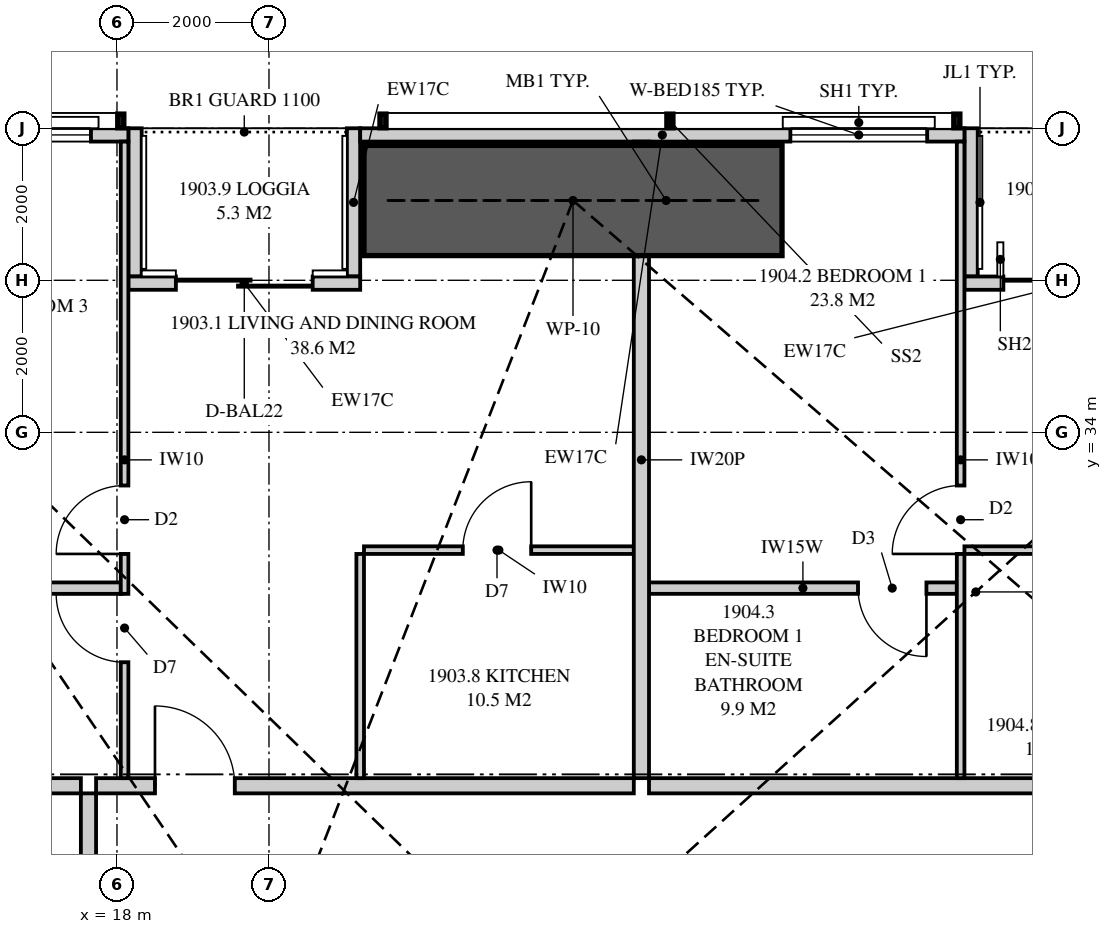
"""IFC4 building model, lengths in metres.
Left out: names, types, materials, properties, quantities, classifications, styles, units other than length and angle.
Written with IfcOpenShell. Run it as: python <this file> out.ifc"""

import sys

from ifc_helpers import new_model, si_unit, direction, frame, frame_2d, origin, place, context, subcontext, project, spatial, polyline, rectangle, outline, extrude, element, fill, save


model = new_model("IFC4")
c1 = context("Model", 3, precision=1e-05, world=origin(), true_north=direction((0.0, 1.0)))
c2 = subcontext(c1, "Body", "Model", "MODEL_VIEW")
j1 = project(units=[si_unit("LENGTHUNIT", "METRE"), si_unit("PLANEANGLEUNIT", "RADIAN")], contexts=[c1])
p1 = place(None, origin())
s1 = spatial("IfcSite", under=j1, at=p1, CompositionType="ELEMENT")
p2 = place(p1, origin())
s2 = spatial("IfcBuilding", under=s1, at=p2, CompositionType="ELEMENT")
p3 = place(p2, frame((0.0, 0.0, 71.25)))
s3 = spatial("IfcBuildingStorey", under=s2, at=p3, CompositionType="ELEMENT", Elevation=71.25)
p4 = place(p3, frame((29.15, 37.913, 0.0), z_axis=(0.0, 0.0, 1.0), x_axis=(-1.0, 0.0, 0.0)))
e1 = element("IfcWall", 1, at=p4, inside=s3, PredefinedType="SOLIDWALL", context=c2, shape_type="SweptSolid", body=[
    extrude(rectangle(XDim=7.95, YDim=0.175, at=frame_2d((3.975, 0.0))), origin(), (0.0, 0.0, 1.0), 3.22),
])
p5 = place(p4, frame((0.49, 0.0, 0.4)))
e2 = element("IfcOpeningElement", 2, at=p5, cuts=e1, PredefinedType="OPENING", context=c2, shape_type="SweptSolid", body=[
    extrude(rectangle(XDim=1.8, YDim=1.85, at=frame_2d((0.9, 0.925))), frame((0.0, 0.097, 0.0), z_axis=(0.0, -1.0, 0.0), x_axis=(1.0, 0.0, 0.0)), (0.0, 0.0, 1.0), 0.195),
])
p6 = place(p3, frame((18.15, 37.913, 0.0), z_axis=(0.0, 0.0, 1.0), x_axis=(-1.0, 0.0, 0.0)))
e3 = element("IfcWall", 3, at=p6, inside=s3, PredefinedType="SOLIDWALL", context=c2, shape_type="SweptSolid", body=[
    extrude(rectangle(XDim=13.099, YDim=0.175, at=frame_2d((6.549, 0.0))), origin(), (0.0, 0.0, 1.0), 3.22),
])
p7 = place(p6, frame((0.492, 0.0, 0.4)))
e4 = element("IfcOpeningElement", 4, at=p7, cuts=e3, PredefinedType="OPENING", context=c2, shape_type="SweptSolid", body=[
    extrude(rectangle(XDim=1.8, YDim=1.85, at=frame_2d((0.9, 0.925))), frame((0.0, 0.097, 0.0), z_axis=(0.0, -1.0, 0.0), x_axis=(1.0, 0.0, 0.0)), (0.0, 0.0, 1.0), 0.195),
])
p8 = place(p6, frame((8.065, 0.0, 0.4)))
e5 = element("IfcOpeningElement", 5, at=p8, cuts=e3, PredefinedType="OPENING", context=c2, shape_type="SweptSolid", body=[
    extrude(rectangle(XDim=1.8, YDim=1.85, at=frame_2d((0.9, 0.925))), frame((0.0, 0.097, 0.0), z_axis=(0.0, -1.0, 0.0), x_axis=(1.0, 0.0, 0.0)), (0.0, 0.0, 1.0), 0.195),
])
p9 = place(p3, frame((31.975, 35.962, 0.0), z_axis=(0.0, 0.0, 1.0), x_axis=(-1.0, 0.0, 0.0)))
e6 = element("IfcWall", 6, at=p9, inside=s3, PredefinedType="SOLIDWALL", context=c2, shape_type="SweptSolid", body=[
    extrude(rectangle(XDim=2.825, YDim=0.175, at=frame_2d((1.413, 0.0))), origin(), (0.0, 0.0, 1.0), 3.22),
])
p10 = place(p9, frame((0.512, 0.0, 0.0)))
e7 = element("IfcOpeningElement", 7, at=p10, cuts=e6, PredefinedType="OPENING", context=c2, shape_type="SweptSolid", body=[
    extrude(rectangle(XDim=1.8, YDim=2.25, at=frame_2d((0.9, 1.125))), frame((0.0, 0.097, 0.0), z_axis=(0.0, -1.0, 0.0), x_axis=(1.0, 0.0, 0.0)), (0.0, 0.0, 1.0), 0.195),
])
p11 = place(p3, frame((29.238, 38.0, 0.0), z_axis=(0.0, 0.0, 1.0), x_axis=(0.0, -1.0, 0.0)))
e8 = element("IfcWall", 8, at=p11, inside=s3, PredefinedType="SOLIDWALL", context=c2, shape_type="SweptSolid", body=[
    extrude(outline(polyline([(0.0, 0.0), (1.95, 0.0), (1.95, 3.22), (1.65, 3.22), (1.65, 2.1), (0.25, 2.1), (0.25, 3.22), (0.0, 3.22), (0.0, 0.0)])), frame((0.0, 0.087, 0.0), z_axis=(0.0, -1.0, 0.0), x_axis=(1.0, 0.0, 0.0)), (0.0, 0.0, 1.0), 0.175),
])
p12 = place(p3, frame((21.2, 35.962, 0.0), z_axis=(0.0, 0.0, 1.0), x_axis=(-1.0, 0.0, 0.0)))
e9 = element("IfcWall", 9, at=p12, inside=s3, PredefinedType="SOLIDWALL", context=c2, shape_type="SweptSolid", body=[
    extrude(rectangle(XDim=3.05, YDim=0.175, at=frame_2d((1.525, 0.0))), origin(), (0.0, 0.0, 1.0), 3.22),
])
p13 = place(p12, frame((0.625, 0.0, 0.0)))
e10 = element("IfcOpeningElement", 10, at=p13, cuts=e9, PredefinedType="OPENING", context=c2, shape_type="SweptSolid", body=[
    extrude(rectangle(XDim=1.8, YDim=2.25, at=frame_2d((0.9, 1.125))), frame((0.0, 0.097, 0.0), z_axis=(0.0, -1.0, 0.0), x_axis=(1.0, 0.0, 0.0)), (0.0, 0.0, 1.0), 0.195),
])
for number, where, z_axis, x_axis in (
    (11, (21.113, 38.0, 0.0), (0.0, 0.0, 1.0), (0.0, -1.0, 0.0)),
    (12, (18.238, 38.0, 0.0), (0.0, 0.0, 1.0), (0.0, -1.0, 0.0)),
):
    element("IfcWall", number, at=place(p3, frame(where, z_axis=z_axis, x_axis=x_axis)), inside=s3, PredefinedType="SOLIDWALL", context=c2, shape_type="SweptSolid", body=[
        extrude(outline(polyline([(0.0, 0.0), (1.95, 0.0), (1.95, 3.22), (1.65, 3.22), (1.65, 2.1), (0.25, 2.1), (0.25, 3.22), (0.0, 3.22), (0.0, 0.0)])), frame((0.0, 0.087, 0.0), z_axis=(0.0, -1.0, 0.0), x_axis=(1.0, 0.0, 0.0)), (0.0, 0.0, 1.0), 0.175),
    ])
p14 = place(p3, frame((24.9, 37.825, 0.0), z_axis=(0.0, 0.0, 1.0), x_axis=(0.0, -1.0, 0.0)))
e13 = element("IfcWall", 13, at=p14, inside=s3, PredefinedType="PARTITIONING", context=c2, shape_type="SweptSolid", body=[
    extrude(outline(polyline([(8.375, 0.0), (8.375, 3.22), (1.953, 3.22), (1.953, 2.641), (1.475, 2.641), (1.475, 2.1), (1.021, 2.1), (1.021, 1.356), (0.529, 1.356), (0.529, 2.1), (0.075, 2.1), (0.075, 3.22), (0.0, 3.22), (0.0, 0.0), (0.529, 0.0), (0.529, 0.944), (1.021, 0.944), (1.021, 0.0), (8.375, 0.0)])), frame((0.0, 0.1, 0.0), z_axis=(0.0, -1.0, 0.0), x_axis=(1.0, 0.0, 0.0)), (0.0, 0.0, 1.0), 0.2),
])
p15 = place(p3, frame((17.725, 29.35, 0.0), z_axis=(0.0, 0.0, 1.0), x_axis=(1.0, 0.0, 0.0)))
e14 = element("IfcWall", 14, at=p15, inside=s3, PredefinedType="PARTITIONING", context=c2, shape_type="SweptSolid", body=[
    extrude(outline(polyline([(0.0, 0.0), (7.075, 0.0), (7.075, 3.22), (6.564, 3.22), (6.564, 2.694), (5.986, 2.694), (5.986, 3.22), (3.641, 3.22), (3.641, 2.641), (2.757, 2.641), (2.757, 3.22), (0.862, 3.22), (0.862, 2.641), (0.155, 2.641), (0.155, 3.22), (0.0, 3.22), (0.0, 0.0)])), frame((0.0, 0.1, 0.0), z_axis=(0.0, -1.0, 0.0), x_axis=(1.0, 0.0, 0.0)), (0.0, 0.0, 1.0), 0.2),
])
p16 = place(p15, frame((0.775, 0.0, 0.0)))
e15 = element("IfcOpeningElement", 15, at=p16, cuts=e14, PredefinedType="OPENING", context=c2, shape_type="SweptSolid", body=[
    extrude(rectangle(XDim=1.05, YDim=2.2, at=frame_2d((0.525, 1.1))), frame((0.0, 0.11, 0.0), z_axis=(0.0, -1.0, 0.0), x_axis=(1.0, 0.0, 0.0)), (0.0, 0.0, 1.0), 0.22),
])
p17 = place(p3, frame((18.1, 37.825, 0.0), z_axis=(0.0, 0.0, 1.0), x_axis=(0.0, -1.0, 0.0)))
e16 = element("IfcWall", 16, at=p17, inside=s3, PredefinedType="PARTITIONING", context=c2, shape_type="SweptSolid", body=[
    extrude(outline(polyline([(0.0, 0.0), (8.375, 0.0), (8.375, 2.641), (7.785, 2.641), (7.785, 3.22), (6.109, 3.22), (6.109, 2.641), (5.353, 2.641), (5.353, 3.22), (1.475, 3.22), (1.475, 2.1), (0.075, 2.1), (0.075, 3.22), (0.0, 3.22), (0.0, 0.0)])), frame((0.0, 0.05, 0.0), z_axis=(0.0, -1.0, 0.0), x_axis=(1.0, 0.0, 0.0)), (0.0, 0.0, 1.0), 0.1),
])
p18 = place(p17, frame((4.525, 0.0, 0.0)))
e17 = element("IfcOpeningElement", 17, at=p18, cuts=e16, PredefinedType="OPENING", context=c2, shape_type="SweptSolid", body=[
    extrude(rectangle(XDim=0.9, YDim=2.1, at=frame_2d((0.45, 1.05))), frame((0.0, 0.06, 0.0), z_axis=(0.0, -1.0, 0.0), x_axis=(1.0, 0.0, 0.0)), (0.0, 0.0, 1.0), 0.12),
])
p19 = place(p17, frame((5.95, 0.0, 0.0)))
e18 = element("IfcOpeningElement", 18, at=p19, cuts=e16, PredefinedType="OPENING", context=c2, shape_type="SweptSolid", body=[
    extrude(rectangle(XDim=0.9, YDim=2.1, at=frame_2d((0.45, 1.05))), frame((0.0, 0.06, 0.0), z_axis=(0.0, -1.0, 0.0), x_axis=(1.0, 0.0, 0.0)), (0.0, 0.0, 1.0), 0.12),
])
p20 = place(p3, frame((13.85, 31.95, 0.0), z_axis=(0.0, 0.0, 1.0), x_axis=(1.0, 0.0, 0.0)))
e19 = element("IfcWall", 19, at=p20, inside=s3, PredefinedType="PLUMBINGWALL", context=c2, shape_type="SweptSolid", body=[
    extrude(outline(polyline([(0.0, 0.0), (4.2, 0.0), (4.2, 2.641), (3.982, 2.641), (3.982, 3.22), (2.953, 3.22), (2.953, 2.641), (2.28, 2.641), (2.28, 3.22), (0.0, 3.22), (0.0, 0.0)])), frame((0.0, 0.075, 0.0), z_axis=(0.0, -1.0, 0.0), x_axis=(1.0, 0.0, 0.0)), (0.0, 0.0, 1.0), 0.15),
])
p21 = place(p3, frame((21.25, 32.45, 0.0), z_axis=(0.0, 0.0, 1.0), x_axis=(1.0, 0.0, 0.0)))
e20 = element("IfcWall", 20, at=p21, inside=s3, PredefinedType="PARTITIONING", context=c2, shape_type="SweptSolid", body=[
    extrude(outline(polyline([(0.0, 0.0), (3.55, 0.0), (3.55, 3.22), (3.04, 3.22), (3.04, 2.694), (2.46, 2.694), (2.46, 3.22), (1.236, 3.22), (1.236, 2.641), (0.691, 2.641), (0.691, 3.22), (0.0, 3.22), (0.0, 0.0)])), frame((0.0, 0.05, 0.0), z_axis=(0.0, -1.0, 0.0), x_axis=(1.0, 0.0, 0.0)), (0.0, 0.0, 1.0), 0.1),
])
p22 = place(p21, frame((1.3, 0.0, 0.0)))
e21 = element("IfcOpeningElement", 21, at=p22, cuts=e20, PredefinedType="OPENING", context=c2, shape_type="SweptSolid", body=[
    extrude(rectangle(XDim=0.9, YDim=2.1, at=frame_2d((0.45, 1.05))), frame((0.0, 0.06, 0.0), z_axis=(0.0, -1.0, 0.0), x_axis=(1.0, 0.0, 0.0)), (0.0, 0.0, 1.0), 0.12),
])
p23 = place(p3, frame((21.2, 32.4, 0.0), z_axis=(0.0, 0.0, 1.0), x_axis=(0.0, -1.0, 0.0)))
e22 = element("IfcWall", 22, at=p23, inside=s3, PredefinedType="PARTITIONING", context=c2, shape_type="SweptSolid", body=[
    extrude(outline(polyline([(0.0, 0.0), (2.95, 0.0), (2.95, 2.641), (1.779, 2.641), (1.779, 3.22), (0.0, 3.22), (0.0, 0.0)])), frame((0.0, 0.05, 0.0), z_axis=(0.0, -1.0, 0.0), x_axis=(1.0, 0.0, 0.0)), (0.0, 0.0, 1.0), 0.1),
])
p24 = place(p3, frame((25.0, 29.35, 0.0), z_axis=(0.0, 0.0, 1.0), x_axis=(1.0, 0.0, 0.0)))
e23 = element("IfcWall", 23, at=p24, inside=s3, PredefinedType="PARTITIONING", context=c2, shape_type="SweptSolid", body=[
    extrude(outline(polyline([(0.0, 0.0), (9.05, 0.0), (9.05, 3.22), (8.373, 3.22), (8.373, 2.641), (7.42, 2.641), (7.42, 3.22), (1.941, 3.22), (1.941, 2.641), (1.015, 2.641), (1.015, 3.22), (0.0, 3.22), (0.0, 0.0)])), frame((0.0, 0.1, 0.0), z_axis=(0.0, -1.0, 0.0), x_axis=(1.0, 0.0, 0.0)), (0.0, 0.0, 1.0), 0.2),
])
p25 = place(p3, frame((29.1, 37.825, 0.0), z_axis=(0.0, 0.0, 1.0), x_axis=(0.0, -1.0, 0.0)))
e24 = element("IfcWall", 24, at=p25, inside=s3, PredefinedType="PARTITIONING", context=c2, shape_type="SweptSolid", body=[
    extrude(outline(polyline([(0.0, 0.0), (8.375, 0.0), (8.375, 3.22), (6.469, 3.22), (6.469, 2.641), (5.742, 2.641), (5.742, 3.22), (5.545, 3.22), (5.545, 2.641), (4.833, 2.641), (4.833, 3.22), (1.475, 3.22), (1.475, 2.1), (0.075, 2.1), (0.075, 3.22), (0.0, 3.22), (0.0, 0.0)])), frame((0.0, 0.05, 0.0), z_axis=(0.0, -1.0, 0.0), x_axis=(1.0, 0.0, 0.0)), (0.0, 0.0, 1.0), 0.1),
])
p26 = place(p25, frame((4.525, 0.0, 0.0)))
e25 = element("IfcOpeningElement", 25, at=p26, cuts=e24, PredefinedType="OPENING", context=c2, shape_type="SweptSolid", body=[
    extrude(rectangle(XDim=0.9, YDim=2.1, at=frame_2d((0.45, 1.05))), frame((0.0, 0.06, 0.0), z_axis=(0.0, -1.0, 0.0), x_axis=(1.0, 0.0, 0.0)), (0.0, 0.0, 1.0), 0.12),
])
p27 = place(p3, frame((25.0, 31.95, 0.0), z_axis=(0.0, 0.0, 1.0), x_axis=(1.0, 0.0, 0.0)))
e26 = element("IfcWall", 26, at=p27, inside=s3, PredefinedType="PLUMBINGWALL", context=c2, shape_type="SweptSolid", body=[
    extrude(outline(polyline([(0.0, 0.0), (4.05, 0.0), (4.05, 2.641), (3.92, 2.641), (3.92, 3.22), (0.0, 3.22), (0.0, 0.0)])), frame((0.0, 0.075, 0.0), z_axis=(0.0, -1.0, 0.0), x_axis=(1.0, 0.0, 0.0)), (0.0, 0.0, 1.0), 0.15),
])
p28 = place(p27, frame((2.75, 0.0, 0.0)))
e27 = element("IfcOpeningElement", 27, at=p28, cuts=e26, PredefinedType="OPENING", context=c2, shape_type="SweptSolid", body=[
    extrude(rectangle(XDim=0.9, YDim=2.1, at=frame_2d((0.45, 1.05))), frame((0.0, 0.085, 0.0), z_axis=(0.0, -1.0, 0.0), x_axis=(1.0, 0.0, 0.0)), (0.0, 0.0, 1.0), 0.17),
])
p29 = place(p3, frame((29.15, 32.45, 0.0), z_axis=(0.0, 0.0, 1.0), x_axis=(1.0, 0.0, 0.0)))
e28 = element("IfcWall", 28, at=p29, inside=s3, PredefinedType="PARTITIONING", context=c2, shape_type="SweptSolid", body=[
    extrude(outline(polyline([(0.0, 0.0), (3.55, 0.0), (3.55, 3.22), (1.167, 3.22), (1.167, 2.641), (0.0, 2.641), (0.0, 0.0)])), frame((0.0, 0.05, 0.0), z_axis=(0.0, -1.0, 0.0), x_axis=(1.0, 0.0, 0.0)), (0.0, 0.0, 1.0), 0.1),
])
p30 = place(p29, frame((1.35, 0.0, 0.0)))
e29 = element("IfcOpeningElement", 29, at=p30, cuts=e28, PredefinedType="OPENING", context=c2, shape_type="SweptSolid", body=[
    extrude(rectangle(XDim=0.9, YDim=2.1, at=frame_2d((0.45, 1.05))), frame((0.0, 0.06, 0.0), z_axis=(0.0, -1.0, 0.0), x_axis=(1.0, 0.0, 0.0)), (0.0, 0.0, 1.0), 0.12),
])
p31 = place(p3, frame((2.0, 29.35, 0.0), z_axis=(0.0, 0.0, 1.0), x_axis=(1.0, 0.0, 0.0)))
e30 = element("IfcWall", 30, at=p31, inside=s3, PredefinedType="PARTITIONING", context=c2, shape_type="SweptSolid", body=[
    extrude(outline(polyline([(0.0, 0.0), (15.525, 0.0), (15.525, 3.22), (11.349, 3.22), (11.349, 2.621), (10.651, 2.621), (10.651, 3.22), (9.51, 3.22), (9.51, 2.62), (6.89, 2.62), (6.89, 3.22), (2.98, 3.22), (2.98, 2.621), (2.381, 2.621), (2.381, 2.1), (0.93, 2.1), (0.93, 3.22), (0.0, 3.22), (0.0, 0.0)])), frame((0.0, 0.1, 0.0), z_axis=(0.0, -1.0, 0.0), x_axis=(1.0, 0.0, 0.0)), (0.0, 0.0, 1.0), 0.2),
])
p32 = place(p3, frame((17.625, 14.1, 0.0), z_axis=(0.0, 0.0, 1.0), x_axis=(0.0, 1.0, 0.0)))
e31 = element("IfcWall", 31, at=p32, inside=s3, PredefinedType="PARTITIONING", context=c2, shape_type="SweptSolid", body=[
    extrude(outline(polyline([(0.0, 0.0), (15.15, 0.0), (15.15, 3.22), (11.4, 3.22), (11.4, 2.22), (10.4, 2.22), (10.4, 3.22), (0.0, 3.22), (0.0, 0.0)])), frame((0.0, 0.1, 0.0), z_axis=(0.0, -1.0, 0.0), x_axis=(1.0, 0.0, 0.0)), (0.0, 0.0, 1.0), 0.2),
])
p33 = place(p32, frame((7.075, 0.0, 0.0)))
e32 = element("IfcOpeningElement", 32, at=p33, cuts=e31, PredefinedType="OPENING", context=c2, shape_type="SweptSolid", body=[
    extrude(rectangle(XDim=1.05, YDim=2.2, at=frame_2d((0.525, 1.1))), frame((0.0, 0.11, 0.0), z_axis=(0.0, -1.0, 0.0), x_axis=(1.0, 0.0, 0.0)), (0.0, 0.0, 1.0), 0.22),
])
p34 = place(p3, frame((21.25, 37.05, 0.0), z_axis=(0.0, 0.0, 1.0), x_axis=(1.0, 0.0, 0.0)))
e33 = element("IfcWall", 33, at=p34, inside=s3, PredefinedType="SHEAR", context=c2, shape_type="SweptSolid", body=[
    extrude(rectangle(XDim=5.5, YDim=1.45, at=frame_2d((2.75, 0.0))), origin(), (0.0, 0.0, 1.0), 3.5),
])
p35 = place(p10, origin())
e34 = element("IfcDoor", 34, at=p35, inside=s3, OperationType="SLIDING_TO_LEFT", PredefinedType="DOOR", context=c2, shape_type="SweptSolid", body=[
    extrude(rectangle(XDim=1.8, YDim=2.25, at=frame_2d((0.9, 1.125))), frame((0.0, 0.025, 0.0), z_axis=(0.0, -1.0, 0.0), x_axis=(1.0, 0.0, 0.0)), (0.0, 0.0, 1.0), 0.05),
])
fill(e7, e34)
p36 = place(p5, origin())
e35 = element("IfcWindow", 35, at=p36, inside=s3, PartitioningType="SINGLE_PANEL", PredefinedType="WINDOW", context=c2, shape_type="SweptSolid", body=[
    extrude(rectangle(XDim=1.8, YDim=1.85, at=frame_2d((0.9, 0.925))), frame((0.0, 0.03, 0.0), z_axis=(0.0, -1.0, 0.0), x_axis=(1.0, 0.0, 0.0)), (0.0, 0.0, 1.0), 0.06),
])
fill(e2, e35)
p37 = place(p13, origin())
e36 = element("IfcDoor", 36, at=p37, inside=s3, OperationType="SLIDING_TO_LEFT", PredefinedType="DOOR", context=c2, shape_type="SweptSolid", body=[
    extrude(rectangle(XDim=1.8, YDim=2.25, at=frame_2d((0.9, 1.125))), frame((0.0, 0.025, 0.0), z_axis=(0.0, -1.0, 0.0), x_axis=(1.0, 0.0, 0.0)), (0.0, 0.0, 1.0), 0.05),
])
fill(e10, e36)
p38 = place(p7, origin())
e37 = element("IfcWindow", 37, at=p38, inside=s3, PartitioningType="SINGLE_PANEL", PredefinedType="WINDOW", context=c2, shape_type="SweptSolid", body=[
    extrude(rectangle(XDim=1.8, YDim=1.85, at=frame_2d((0.9, 0.925))), frame((0.0, 0.03, 0.0), z_axis=(0.0, -1.0, 0.0), x_axis=(1.0, 0.0, 0.0)), (0.0, 0.0, 1.0), 0.06),
])
fill(e4, e37)
p39 = place(p16, origin())
e38 = element("IfcDoor", 38, at=p39, inside=s3, OperationType="SINGLE_SWING_LEFT", PredefinedType="DOOR", context=c2, shape_type="SweptSolid", body=[
    extrude(rectangle(XDim=1.05, YDim=2.2, at=frame_2d((0.525, 1.1))), frame((0.0, 0.025, 0.0), z_axis=(0.0, -1.0, 0.0), x_axis=(1.0, 0.0, 0.0)), (0.0, 0.0, 1.0), 0.05),
])
fill(e15, e38)
p40 = place(p18, frame((0.9, 0.0, 0.0), z_axis=(0.0, 0.0, 1.0), x_axis=(-1.0, 0.0, 0.0)))
e39 = element("IfcDoor", 39, at=p40, inside=s3, OperationType="SINGLE_SWING_LEFT", PredefinedType="DOOR", context=c2, shape_type="SweptSolid", body=[
    extrude(rectangle(XDim=0.9, YDim=2.1, at=frame_2d((0.45, 1.05))), frame((0.0, 0.025, 0.0), z_axis=(0.0, -1.0, 0.0), x_axis=(1.0, 0.0, 0.0)), (0.0, 0.0, 1.0), 0.05),
])
fill(e17, e39)
p41 = place(p19, frame((0.9, 0.0, 0.0), z_axis=(0.0, 0.0, 1.0), x_axis=(-1.0, 0.0, 0.0)))
e40 = element("IfcDoor", 40, at=p41, inside=s3, OperationType="SINGLE_SWING_RIGHT", PredefinedType="DOOR", context=c2, shape_type="SweptSolid", body=[
    extrude(rectangle(XDim=0.9, YDim=2.1, at=frame_2d((0.45, 1.05))), frame((0.0, 0.025, 0.0), z_axis=(0.0, -1.0, 0.0), x_axis=(1.0, 0.0, 0.0)), (0.0, 0.0, 1.0), 0.05),
])
fill(e18, e40)
p42 = place(p22, origin())
e41 = element("IfcDoor", 41, at=p42, inside=s3, OperationType="SINGLE_SWING_RIGHT", PredefinedType="DOOR", context=c2, shape_type="SweptSolid", body=[
    extrude(rectangle(XDim=0.9, YDim=2.1, at=frame_2d((0.45, 1.05))), frame((0.0, 0.025, 0.0), z_axis=(0.0, -1.0, 0.0), x_axis=(1.0, 0.0, 0.0)), (0.0, 0.0, 1.0), 0.05),
])
fill(e21, e41)
p43 = place(p26, frame((0.9, 0.0, 0.0), z_axis=(0.0, 0.0, 1.0), x_axis=(-1.0, 0.0, 0.0)))
e42 = element("IfcDoor", 42, at=p43, inside=s3, OperationType="SINGLE_SWING_LEFT", PredefinedType="DOOR", context=c2, shape_type="SweptSolid", body=[
    extrude(rectangle(XDim=0.9, YDim=2.1, at=frame_2d((0.45, 1.05))), frame((0.0, 0.025, 0.0), z_axis=(0.0, -1.0, 0.0), x_axis=(1.0, 0.0, 0.0)), (0.0, 0.0, 1.0), 0.05),
])
fill(e25, e42)
p44 = place(p28, frame((0.9, 0.0, 0.0), z_axis=(0.0, 0.0, 1.0), x_axis=(-1.0, 0.0, 0.0)))
e43 = element("IfcDoor", 43, at=p44, inside=s3, OperationType="SINGLE_SWING_LEFT", PredefinedType="DOOR", context=c2, shape_type="SweptSolid", body=[
    extrude(rectangle(XDim=0.9, YDim=2.1, at=frame_2d((0.45, 1.05))), frame((0.0, 0.025, 0.0), z_axis=(0.0, -1.0, 0.0), x_axis=(1.0, 0.0, 0.0)), (0.0, 0.0, 1.0), 0.05),
])
fill(e27, e43)
save(model, sys.argv[1])
